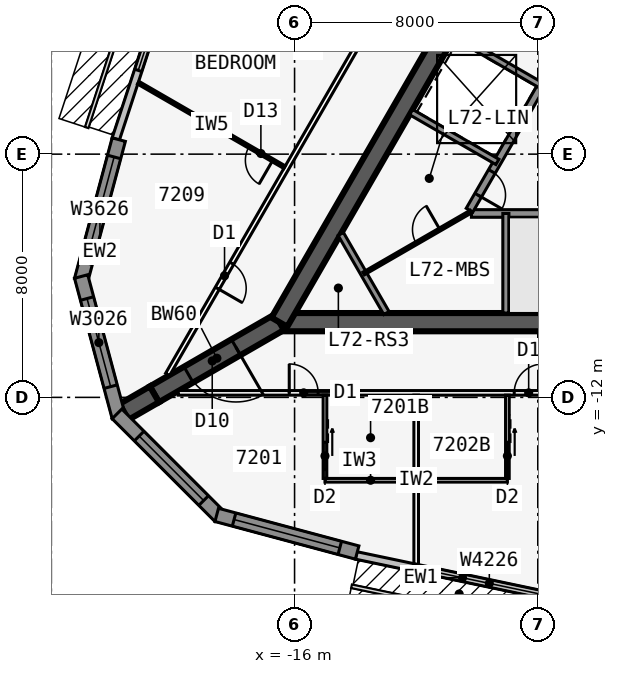
"""IFC4 building model, lengths in metres.
Left out: names, types, materials, properties, quantities, classifications, styles, units other than length and angle.
Written with IfcOpenShell. Run it as: python <this file> out.ifc"""

import sys

from ifc_helpers import new_model, si_unit, direction, frame, frame_2d, origin, place, context, subcontext, project, spatial, polyline, rectangle, outline, extrude, element, fill, save


model = new_model("IFC4")
c1 = context("Model", 3, precision=1e-05, world=origin(), true_north=direction((0.0, 1.0)))
c2 = subcontext(c1, "Body", "Model", "MODEL_VIEW")
j1 = project(units=[si_unit("LENGTHUNIT", "METRE"), si_unit("PLANEANGLEUNIT", "RADIAN")], contexts=[c1])
p1 = place(None, origin())
s1 = spatial("IfcSite", under=j1, at=p1, CompositionType="ELEMENT")
p2 = place(p1, origin())
s2 = spatial("IfcBuilding", under=s1, at=p2, CompositionType="ELEMENT")
p3 = place(p2, frame((0.0, 0.0, 271.7)))
s3 = spatial("IfcBuildingStorey", under=s2, at=p3, CompositionType="ELEMENT", Elevation=271.7)
p4 = place(p3, frame((-16.5, -9.526, 0.0), z_axis=(0.0, 0.0, 1.0), x_axis=(1.0, 0.0, 0.0)))
e1 = element("IfcWall", 1, at=p4, inside=s3, PredefinedType="SHEAR", context=c2, shape_type="SweptSolid", body=[
    extrude(rectangle(XDim=33.0, YDim=0.6, at=frame_2d((16.5, 0.0))), origin(), (0.0, 0.0, 1.0), 3.6),
])
p5 = place(p4, frame((14.05, 0.0, 0.0)))
e2 = element("IfcOpeningElement", 2, at=p5, cuts=e1, PredefinedType="OPENING", context=c2, shape_type="SweptSolid", body=[
    extrude(rectangle(XDim=1.8, YDim=2.13, at=frame_2d((0.9, 1.065))), frame((0.0, 0.31, 0.0), z_axis=(0.0, -1.0, 0.0), x_axis=(1.0, 0.0, 0.0)), (0.0, 0.0, 1.0), 0.62),
])
p6 = place(p3, frame((-10.183, -5.951, 0.0), z_axis=(0.0, 0.0, 1.0), x_axis=(1.0, 0.0, 0.0)))
e3 = element("IfcWall", 3, at=p6, inside=s3, PredefinedType="SOLIDWALL", context=c2, shape_type="SweptSolid", body=[
    extrude(rectangle(XDim=7.633, YDim=0.25, at=frame_2d((3.816, 0.0))), origin(), (0.0, 0.0, 1.0), 3.35),
])
p7 = place(p3, frame((-9.05, -5.951, 0.0), z_axis=(0.0, 0.0, 1.0), x_axis=(0.0, -1.0, 0.0)))
e4 = element("IfcWall", 4, at=p7, inside=s3, PredefinedType="SOLIDWALL", context=c2, shape_type="SweptSolid", body=[
    extrude(rectangle(XDim=3.275, YDim=0.2, at=frame_2d((1.637, 0.0))), origin(), (0.0, 0.0, 1.0), 3.35),
])
p8 = place(p3, frame((0.0, 19.052, 0.0), z_axis=(0.0, 0.0, 1.0), x_axis=(-0.499999749417, -0.866025548458, 0.0)))
e5 = element("IfcWall", 5, at=p8, inside=s3, PredefinedType="SHEAR", context=c2, shape_type="SweptSolid", body=[
    extrude(rectangle(XDim=33.0, YDim=0.6, at=frame_2d((16.5, 0.0))), origin(), (0.0, 0.0, 1.0), 3.6),
])
p9 = place(p8, frame((14.15, 0.0, 0.0)))
e6 = element("IfcOpeningElement", 6, at=p9, cuts=e5, PredefinedType="OPENING", context=c2, shape_type="SweptSolid", body=[
    extrude(rectangle(XDim=1.8, YDim=2.13, at=frame_2d((0.9, 1.065))), frame((0.0, 0.31, 0.0), z_axis=(0.0, -1.0, 0.0), x_axis=(1.0, 0.0, 0.0)), (0.0, 0.0, 1.0), 0.62),
])
p10 = place(p8, frame((12.6, 0.0, 0.0)))
e7 = element("IfcOpeningElement", 7, at=p10, cuts=e5, PredefinedType="OPENING", context=c2, shape_type="SweptSolid", body=[
    extrude(rectangle(XDim=1.0, YDim=2.13, at=frame_2d((0.5, 1.065))), frame((0.0, 0.31, 0.0), z_axis=(0.0, -1.0, 0.0), x_axis=(1.0, 0.0, 0.0)), (0.0, 0.0, 1.0), 0.62),
])
p11 = place(p3, frame((-4.929, 3.365, 0.0), z_axis=(0.0, 0.0, 1.0), x_axis=(-0.499991433582, -0.866030349552, 0.0)))
e8 = element("IfcWall", 8, at=p11, inside=s3, PredefinedType="SOLIDWALL", context=c2, shape_type="SweptSolid", body=[
    extrude(rectangle(XDim=10.633, YDim=0.25, at=frame_2d((5.316, 0.0))), origin(), (0.0, 0.0, 1.0), 3.35),
])
p12 = place(p11, frame((9.164, 0.0, 0.0)))
e9 = element("IfcOpeningElement", 9, at=p12, cuts=e8, PredefinedType="OPENING", context=c2, shape_type="SweptSolid", body=[
    extrude(rectangle(XDim=0.9, YDim=2.13, at=frame_2d((0.45, 1.065))), frame((0.0, 0.135, 0.0), z_axis=(0.0, -1.0, 0.0), x_axis=(1.0, 0.0, 0.0)), (0.0, 0.0, 1.0), 0.27),
])
p13 = place(p11, frame((1.1, 0.0, 0.0)))
e10 = element("IfcOpeningElement", 10, at=p13, cuts=e8, PredefinedType="OPENING", context=c2, shape_type="SweptSolid", body=[
    extrude(rectangle(XDim=0.9, YDim=2.13, at=frame_2d((0.45, 1.065))), frame((0.0, 0.135, 0.0), z_axis=(0.0, -1.0, 0.0), x_axis=(1.0, 0.0, 0.0)), (0.0, 0.0, 1.0), 0.27),
])
p14 = place(p11, frame((4.0, 0.0, 0.0)))
e11 = element("IfcOpeningElement", 11, at=p14, cuts=e8, PredefinedType="OPENING", context=c2, shape_type="SweptSolid", body=[
    extrude(rectangle(XDim=0.9, YDim=2.13, at=frame_2d((0.45, 1.065))), frame((0.0, 0.135, 0.0), z_axis=(0.0, -1.0, 0.0), x_axis=(1.0, 0.0, 0.0)), (0.0, 0.0, 1.0), 0.27),
])
for number, where, z_axis, x_axis in (
    (12, (-7.879, -1.744, 0.0), (0.0, 0.0, 1.0), (-0.866, 0.5, 0.0)),
    (13, (-9.329, -4.256, 0.0), (0.0, 0.0, 1.0), (-0.866, 0.5, 0.0)),
):
    element("IfcWall", number, at=place(p3, frame(where, z_axis=z_axis, x_axis=x_axis)), inside=s3, PredefinedType="SOLIDWALL", context=c2, shape_type="SweptSolid", body=[
        extrude(rectangle(XDim=3.275, YDim=0.2, at=frame_2d((1.637, 0.0))), origin(), (0.0, 0.0, 1.0), 3.35),
    ])
p15 = place(p3, frame((-16.5, -9.526, 0.0), z_axis=(0.0, 0.0, 1.0), x_axis=(-0.866031398331, -0.499989616998, 0.0)))
e14 = element("IfcWall", 14, at=p15, inside=s3, PredefinedType="SHEAR", context=c2, shape_type="SweptSolid", body=[
    extrude(rectangle(XDim=4.746, YDim=0.6, at=frame_2d((2.373, 0.0))), origin(), (0.0, 0.0, 1.0), 3.6),
])
p16 = place(p15, frame((1.65, 0.0, 0.0)))
e15 = element("IfcOpeningElement", 15, at=p16, cuts=e14, PredefinedType="OPENING", context=c2, shape_type="SweptSolid", body=[
    extrude(rectangle(XDim=1.8, YDim=2.13, at=frame_2d((0.9, 1.065))), frame((0.0, 0.31, 0.0), z_axis=(0.0, -1.0, 0.0), x_axis=(1.0, 0.0, 0.0)), (0.0, 0.0, 1.0), 0.62),
])
p17 = place(p3, frame((-20.61, -11.899, 0.0), z_axis=(0.0, 0.0, 1.0), x_axis=(-0.866009537788, -0.500027479704, 0.0)))
e16 = element("IfcWall", 16, at=p17, inside=s3, PredefinedType="SHEAR", context=c2, shape_type="SweptSolid", body=[
    extrude(rectangle(XDim=1.155, YDim=0.6, at=frame_2d((0.577, 0.0))), origin(), (0.0, 0.0, 1.0), 3.6),
])
p18 = place(p3, frame((-13.974, -17.198, 0.0), z_axis=(0.0, 0.0, 1.0), x_axis=(0.978654320409, -0.205513311355, 0.0)))
e17 = element("IfcWall", 17, at=p18, inside=s3, PredefinedType="STANDARD", context=c2, shape_type="SweptSolid", body=[
    extrude(rectangle(XDim=7.153, YDim=0.25, at=frame_2d((3.576, 0.0))), origin(), (0.0, 0.0, 1.0), 3.35),
])
p19 = place(p18, frame((2.376, 0.0, 0.45)))
e18 = element("IfcOpeningElement", 18, at=p19, cuts=e17, PredefinedType="OPENING", context=c2, shape_type="SweptSolid", body=[
    extrude(rectangle(XDim=4.2, YDim=2.6, at=frame_2d((2.1, 1.3))), frame((0.0, 0.135, 0.0), z_axis=(0.0, -1.0, 0.0), x_axis=(1.0, 0.0, 0.0)), (0.0, 0.0, 1.0), 0.27),
])
p20 = place(p3, frame((-19.654, 3.294, 0.0), z_axis=(0.0, 0.0, 1.0), x_axis=(-0.311328857048, -0.95030223759, 0.0)))
e19 = element("IfcWall", 19, at=p20, inside=s3, PredefinedType="STANDARD", context=c2, shape_type="SweptSolid", body=[
    extrude(rectangle(XDim=7.153, YDim=0.25, at=frame_2d((3.576, 0.0))), origin(), (0.0, 0.0, 1.0), 3.35),
])
p21 = place(p20, frame((0.577, 0.0, 0.45)))
e20 = element("IfcOpeningElement", 20, at=p21, cuts=e19, PredefinedType="OPENING", context=c2, shape_type="SweptSolid", body=[
    extrude(rectangle(XDim=4.2, YDim=2.6, at=frame_2d((2.1, 1.3))), frame((0.0, 0.135, 0.0), z_axis=(0.0, -1.0, 0.0), x_axis=(1.0, 0.0, 0.0)), (0.0, 0.0, 1.0), 0.27),
])
p22 = place(p3, frame((-21.783, -3.522, 0.0), z_axis=(0.0, 0.0, 1.0), x_axis=(-0.25880328844, -0.965930048136, 0.0)))
e21 = element("IfcWall", 21, at=p22, inside=s3, PredefinedType="SOLIDWALL", context=c2, shape_type="SweptSolid", body=[
    extrude(rectangle(XDim=4.782, YDim=0.45, at=frame_2d((2.391, 0.0))), origin(), (0.0, 0.0, 1.0), 3.35),
])
p23 = place(p22, frame((0.591, 0.0, 0.45)))
e22 = element("IfcOpeningElement", 22, at=p23, cuts=e21, PredefinedType="OPENING", context=c2, shape_type="SweptSolid", body=[
    extrude(rectangle(XDim=3.6, YDim=2.6, at=frame_2d((1.8, 1.3))), frame((0.0, 0.235, 0.0), z_axis=(0.0, -1.0, 0.0), x_axis=(1.0, 0.0, 0.0)), (0.0, 0.0, 1.0), 0.47),
])
p24 = place(p3, frame((-23.02, -8.025, 0.0), z_axis=(0.0, 0.0, 1.0), x_axis=(0.25880328844, -0.965930048136, 0.0)))
e23 = element("IfcWall", 23, at=p24, inside=s3, PredefinedType="SOLIDWALL", context=c2, shape_type="SweptSolid", body=[
    extrude(outline(polyline([(4.782, 0.225), (4.722, 0.225), (4.375, 0.132), (4.351, 0.225), (0.0, 0.225), (0.0, -0.225), (4.782, -0.225), (4.782, 0.225)])), origin(), (0.0, 0.0, 1.0), 3.35),
])
p25 = place(p24, frame((0.75, 0.0, 0.45)))
e24 = element("IfcOpeningElement", 24, at=p25, cuts=e23, PredefinedType="OPENING", context=c2, shape_type="SweptSolid", body=[
    extrude(rectangle(XDim=3.0, YDim=2.6, at=frame_2d((1.5, 1.3))), frame((0.0, 0.235, 0.0), z_axis=(0.0, -1.0, 0.0), x_axis=(1.0, 0.0, 0.0)), (0.0, 0.0, 1.0), 0.47),
])
p26 = place(p3, frame((-21.841, -12.542, 0.0), z_axis=(0.0, 0.0, 1.0), x_axis=(0.707081252484, -0.707132308968, 0.0)))
e25 = element("IfcWall", 25, at=p26, inside=s3, PredefinedType="SOLIDWALL", context=c2, shape_type="SweptSolid", body=[
    extrude(outline(polyline([(4.782, 0.225), (0.431, 0.225), (0.406, 0.132), (0.059, 0.225), (0.0, 0.225), (0.0, -0.225), (4.782, -0.225), (4.782, 0.225)])), origin(), (0.0, 0.0, 1.0), 3.35),
])
p27 = place(p26, frame((1.031, 0.0, 0.45)))
e26 = element("IfcOpeningElement", 26, at=p27, cuts=e25, PredefinedType="OPENING", context=c2, shape_type="SweptSolid", body=[
    extrude(rectangle(XDim=3.0, YDim=2.6, at=frame_2d((1.5, 1.3))), frame((0.0, 0.235, 0.0), z_axis=(0.0, -1.0, 0.0), x_axis=(1.0, 0.0, 0.0)), (0.0, 0.0, 1.0), 0.47),
])
p28 = place(p3, frame((-18.561, -15.865, 0.0), z_axis=(0.0, 0.0, 1.0), x_axis=(0.965913862671, -0.258863689806, 0.0)))
e27 = element("IfcWall", 27, at=p28, inside=s3, PredefinedType="SOLIDWALL", context=c2, shape_type="SweptSolid", body=[
    extrude(rectangle(XDim=4.782, YDim=0.45, at=frame_2d((2.391, 0.0))), origin(), (0.0, 0.0, 1.0), 3.35),
])
p29 = place(p28, frame((0.591, 0.0, 0.45)))
e28 = element("IfcOpeningElement", 28, at=p29, cuts=e27, PredefinedType="OPENING", context=c2, shape_type="SweptSolid", body=[
    extrude(rectangle(XDim=3.6, YDim=2.6, at=frame_2d((1.8, 1.3))), frame((0.0, 0.235, 0.0), z_axis=(0.0, -1.0, 0.0), x_axis=(1.0, 0.0, 0.0)), (0.0, 0.0, 1.0), 0.47),
])
p30 = place(p3, frame((-19.827, -11.851, 0.0), z_axis=(0.0, 0.0, 1.0), x_axis=(1.0, 0.0, 0.0)))
e29 = element("IfcWall", 29, at=p30, inside=s3, PredefinedType="PARTITIONING", context=c2, shape_type="SweptSolid", body=[
    extrude(rectangle(XDim=39.654, YDim=0.15, at=frame_2d((19.827, 0.0))), origin(), (0.0, 0.0, 1.0), 3.35),
])
p31 = place(p30, frame((3.652, 0.0, 0.0)))
e30 = element("IfcOpeningElement", 30, at=p31, cuts=e29, PredefinedType="OPENING", context=c2, shape_type="SweptSolid", body=[
    extrude(rectangle(XDim=0.95, YDim=2.13, at=frame_2d((0.475, 1.065))), frame((0.0, 0.085, 0.0), z_axis=(0.0, -1.0, 0.0), x_axis=(1.0, 0.0, 0.0)), (0.0, 0.0, 1.0), 0.17),
])
p32 = place(p30, frame((11.052, 0.0, 0.0)))
e31 = element("IfcOpeningElement", 31, at=p32, cuts=e29, PredefinedType="OPENING", context=c2, shape_type="SweptSolid", body=[
    extrude(rectangle(XDim=0.95, YDim=2.13, at=frame_2d((0.475, 1.065))), frame((0.0, 0.085, 0.0), z_axis=(0.0, -1.0, 0.0), x_axis=(1.0, 0.0, 0.0)), (0.0, 0.0, 1.0), 0.17),
])
p33 = place(p30, frame((19.052, 0.0, 0.0)))
e32 = element("IfcOpeningElement", 32, at=p33, cuts=e29, PredefinedType="OPENING", context=c2, shape_type="SweptSolid", body=[
    extrude(rectangle(XDim=0.95, YDim=2.13, at=frame_2d((0.475, 1.065))), frame((0.0, 0.085, 0.0), z_axis=(0.0, -1.0, 0.0), x_axis=(1.0, 0.0, 0.0)), (0.0, 0.0, 1.0), 0.17),
])
p34 = place(p30, frame((27.052, 0.0, 0.0)))
e33 = element("IfcOpeningElement", 33, at=p34, cuts=e29, PredefinedType="OPENING", context=c2, shape_type="SweptSolid", body=[
    extrude(rectangle(XDim=0.95, YDim=2.13, at=frame_2d((0.475, 1.065))), frame((0.0, 0.085, 0.0), z_axis=(0.0, -1.0, 0.0), x_axis=(1.0, 0.0, 0.0)), (0.0, 0.0, 1.0), 0.17),
])
p35 = place(p30, frame((35.052, 0.0, 0.0)))
e34 = element("IfcOpeningElement", 34, at=p35, cuts=e29, PredefinedType="OPENING", context=c2, shape_type="SweptSolid", body=[
    extrude(rectangle(XDim=0.95, YDim=2.13, at=frame_2d((0.475, 1.065))), frame((0.0, 0.085, 0.0), z_axis=(0.0, -1.0, 0.0), x_axis=(1.0, 0.0, 0.0)), (0.0, 0.0, 1.0), 0.17),
])
p36 = place(p3, frame((-12.0, -11.926, 0.0), z_axis=(0.0, 0.0, 1.0), x_axis=(0.0, -1.0, 0.0)))
e35 = element("IfcWall", 35, at=p36, inside=s3, PredefinedType="PARTITIONING", context=c2, shape_type="SweptSolid", body=[
    extrude(rectangle(XDim=5.559, YDim=0.15, at=frame_2d((2.779, 0.0))), origin(), (0.0, 0.0, 1.0), 2.301),
])
p37 = place(p3, frame((-15.0, -14.726, 0.0), z_axis=(0.0, 0.0, 1.0), x_axis=(1.0, 0.0, 0.0)))
e36 = element("IfcWall", 36, at=p37, inside=s3, PredefinedType="PLUMBINGWALL", context=c2, shape_type="SweptSolid", body=[
    extrude(rectangle(XDim=3.0, YDim=0.12, at=frame_2d((1.5, 0.0))), origin(), (0.0, 0.0, 1.0), 3.35),
])
p38 = place(p3, frame((-15.0, -11.926, 0.0), z_axis=(0.0, 0.0, 1.0), x_axis=(0.0, -1.0, 0.0)))
e37 = element("IfcWall", 37, at=p38, inside=s3, PredefinedType="PLUMBINGWALL", context=c2, shape_type="SweptSolid", body=[
    extrude(rectangle(XDim=2.74, YDim=0.12, at=frame_2d((1.37, 0.0))), origin(), (0.0, 0.0, 1.0), 3.35),
])
p39 = place(p38, frame((1.55, 0.0, 0.0)))
e38 = element("IfcOpeningElement", 38, at=p39, cuts=e37, PredefinedType="OPENING", context=c2, shape_type="SweptSolid", body=[
    extrude(rectangle(XDim=0.9, YDim=2.13, at=frame_2d((0.45, 1.065))), frame((0.0, 0.07, 0.0), z_axis=(0.0, -1.0, 0.0), x_axis=(1.0, 0.0, 0.0)), (0.0, 0.0, 1.0), 0.14),
])
p40 = place(p3, frame((-12.0, -14.726, 0.0), z_axis=(0.0, 0.0, 1.0), x_axis=(1.0, 0.0, 0.0)))
e39 = element("IfcWall", 39, at=p40, inside=s3, PredefinedType="PLUMBINGWALL", context=c2, shape_type="SweptSolid", body=[
    extrude(rectangle(XDim=3.0, YDim=0.12, at=frame_2d((1.5, 0.0))), origin(), (0.0, 0.0, 1.0), 3.35),
])
p41 = place(p3, frame((-9.0, -11.926, 0.0), z_axis=(0.0, 0.0, 1.0), x_axis=(0.0, -1.0, 0.0)))
e40 = element("IfcWall", 40, at=p41, inside=s3, PredefinedType="PLUMBINGWALL", context=c2, shape_type="SweptSolid", body=[
    extrude(rectangle(XDim=2.74, YDim=0.12, at=frame_2d((1.37, 0.0))), origin(), (0.0, 0.0, 1.0), 3.35),
])
p42 = place(p41, frame((1.55, 0.0, 0.0)))
e41 = element("IfcOpeningElement", 41, at=p42, cuts=e40, PredefinedType="OPENING", context=c2, shape_type="SweptSolid", body=[
    extrude(rectangle(XDim=0.9, YDim=2.13, at=frame_2d((0.45, 1.065))), frame((0.0, 0.07, 0.0), z_axis=(0.0, -1.0, 0.0), x_axis=(1.0, 0.0, 0.0)), (0.0, 0.0, 1.0), 0.14),
])
p43 = place(p3, frame((-0.35, 23.096, 0.0), z_axis=(0.0, 0.0, 1.0), x_axis=(-0.499998875317, -0.866026053119, 0.0)))
e42 = element("IfcWall", 42, at=p43, inside=s3, PredefinedType="PARTITIONING", context=c2, shape_type="SweptSolid", body=[
    extrude(rectangle(XDim=39.654, YDim=0.15, at=frame_2d((19.827, 0.0))), origin(), (0.0, 0.0, 1.0), 3.35),
])
p44 = place(p43, frame((3.272, 0.0, 0.0)))
e43 = element("IfcOpeningElement", 43, at=p44, cuts=e42, PredefinedType="OPENING", context=c2, shape_type="SweptSolid", body=[
    extrude(rectangle(XDim=0.95, YDim=2.13, at=frame_2d((0.475, 1.065))), frame((0.0, 0.085, 0.0), z_axis=(0.0, -1.0, 0.0), x_axis=(1.0, 0.0, 0.0)), (0.0, 0.0, 1.0), 0.17),
])
p45 = place(p43, frame((19.052, 0.0, 0.0)))
e44 = element("IfcOpeningElement", 44, at=p45, cuts=e42, PredefinedType="OPENING", context=c2, shape_type="SweptSolid", body=[
    extrude(rectangle(XDim=0.95, YDim=2.13, at=frame_2d((0.475, 1.065))), frame((0.0, 0.085, 0.0), z_axis=(0.0, -1.0, 0.0), x_axis=(1.0, 0.0, 0.0)), (0.0, 0.0, 1.0), 0.17),
])
p46 = place(p43, frame((35.432, 0.0, 0.0)))
e45 = element("IfcOpeningElement", 45, at=p46, cuts=e42, PredefinedType="OPENING", context=c2, shape_type="SweptSolid", body=[
    extrude(rectangle(XDim=0.95, YDim=2.13, at=frame_2d((0.475, 1.065))), frame((0.0, 0.085, 0.0), z_axis=(0.0, -1.0, 0.0), x_axis=(1.0, 0.0, 0.0)), (0.0, 0.0, 1.0), 0.17),
])
p47 = place(p3, frame((-16.329, -4.429, 0.0), z_axis=(0.0, 0.0, 1.0), x_axis=(-0.866029066823, 0.499993655377, 0.0)))
e46 = element("IfcWall", 46, at=p47, inside=s3, PredefinedType="PARTITIONING", context=c2, shape_type="SweptSolid", body=[
    extrude(rectangle(XDim=5.559, YDim=0.1, at=frame_2d((2.779, 0.0))), origin(), (0.0, 0.0, 1.0), 2.301),
])
p48 = place(p47, frame((0.45, 0.0, 0.0)))
e47 = element("IfcOpeningElement", 47, at=p48, cuts=e46, PredefinedType="OPENING", context=c2, shape_type="SweptSolid", body=[
    extrude(rectangle(XDim=0.9, YDim=2.13, at=frame_2d((0.45, 1.065))), frame((0.0, 0.06, 0.0), z_axis=(0.0, -1.0, 0.0), x_axis=(1.0, 0.0, 0.0)), (0.0, 0.0, 1.0), 0.12),
])
p49 = place(p3, frame((-12.978, -9.226, 0.0), z_axis=(0.0, 0.0, 1.0), x_axis=(-0.499952404951, 0.866052881055, 0.0)))
e48 = element("IfcWall", 48, at=p49, inside=s3, PredefinedType="SOLIDWALL", context=c2, shape_type="SweptSolid", body=[
    extrude(rectangle(XDim=3.002, YDim=0.2, at=frame_2d((1.501, 0.0))), origin(), (0.0, 0.0, 1.0), 3.35),
])
p50 = place(p3, frame((-13.729, -7.926, 0.0), z_axis=(0.0, 0.0, 1.0), x_axis=(0.866029956157, 0.499992114976, 0.0)))
e49 = element("IfcWall", 49, at=p50, inside=s3, PredefinedType="PARTITIONING", context=c2, shape_type="SweptSolid", body=[
    extrude(rectangle(XDim=4.075, YDim=0.1, at=frame_2d((2.038, 0.0))), origin(), (0.0, 0.0, 1.0), 3.35),
])
p51 = place(p50, frame((1.995, 0.0, 0.0)))
e50 = element("IfcOpeningElement", 50, at=p51, cuts=e49, PredefinedType="OPENING", context=c2, shape_type="SweptSolid", body=[
    extrude(rectangle(XDim=0.9, YDim=2.13, at=frame_2d((0.45, 1.065))), frame((0.0, 0.06, 0.0), z_axis=(0.0, -1.0, 0.0), x_axis=(1.0, 0.0, 0.0)), (0.0, 0.0, 1.0), 0.12),
])
p52 = place(p19, origin())
e51 = element("IfcWindow", 51, at=p52, inside=s3, PartitioningType="SINGLE_PANEL", PredefinedType="WINDOW", context=c2, shape_type="SweptSolid", body=[
    extrude(rectangle(XDim=4.2, YDim=2.6, at=frame_2d((2.1, 1.3))), frame((0.0, 0.03, 0.0), z_axis=(0.0, -1.0, 0.0), x_axis=(1.0, 0.0, 0.0)), (0.0, 0.0, 1.0), 0.06),
])
fill(e18, e51)
p53 = place(p21, origin())
e52 = element("IfcWindow", 52, at=p53, inside=s3, PartitioningType="SINGLE_PANEL", PredefinedType="WINDOW", context=c2, shape_type="SweptSolid", body=[
    extrude(rectangle(XDim=4.2, YDim=2.6, at=frame_2d((2.1, 1.3))), frame((0.0, 0.03, 0.0), z_axis=(0.0, -1.0, 0.0), x_axis=(1.0, 0.0, 0.0)), (0.0, 0.0, 1.0), 0.06),
])
fill(e20, e52)
p54 = place(p23, origin())
e53 = element("IfcWindow", 53, at=p54, inside=s3, PartitioningType="SINGLE_PANEL", PredefinedType="WINDOW", context=c2, shape_type="SweptSolid", body=[
    extrude(rectangle(XDim=3.6, YDim=2.6, at=frame_2d((1.8, 1.3))), frame((0.0, 0.03, 0.0), z_axis=(0.0, -1.0, 0.0), x_axis=(1.0, 0.0, 0.0)), (0.0, 0.0, 1.0), 0.06),
])
fill(e22, e53)
p55 = place(p25, origin())
e54 = element("IfcWindow", 54, at=p55, inside=s3, PartitioningType="SINGLE_PANEL", PredefinedType="WINDOW", context=c2, shape_type="SweptSolid", body=[
    extrude(rectangle(XDim=3.0, YDim=2.6, at=frame_2d((1.5, 1.3))), frame((0.0, 0.03, 0.0), z_axis=(0.0, -1.0, 0.0), x_axis=(1.0, 0.0, 0.0)), (0.0, 0.0, 1.0), 0.06),
])
fill(e24, e54)
p56 = place(p27, origin())
e55 = element("IfcWindow", 55, at=p56, inside=s3, PartitioningType="SINGLE_PANEL", PredefinedType="WINDOW", context=c2, shape_type="SweptSolid", body=[
    extrude(rectangle(XDim=3.0, YDim=2.6, at=frame_2d((1.5, 1.3))), frame((0.0, 0.03, 0.0), z_axis=(0.0, -1.0, 0.0), x_axis=(1.0, 0.0, 0.0)), (0.0, 0.0, 1.0), 0.06),
])
fill(e26, e55)
p57 = place(p29, origin())
e56 = element("IfcWindow", 56, at=p57, inside=s3, PartitioningType="SINGLE_PANEL", PredefinedType="WINDOW", context=c2, shape_type="SweptSolid", body=[
    extrude(rectangle(XDim=3.6, YDim=2.6, at=frame_2d((1.8, 1.3))), frame((0.0, 0.03, 0.0), z_axis=(0.0, -1.0, 0.0), x_axis=(1.0, 0.0, 0.0)), (0.0, 0.0, 1.0), 0.06),
])
fill(e28, e56)
p58 = place(p39, origin())
e57 = element("IfcDoor", 57, at=p58, inside=s3, OperationType="SLIDING_TO_LEFT", PredefinedType="DOOR", context=c2, shape_type="SweptSolid", body=[
    extrude(rectangle(XDim=0.9, YDim=2.13, at=frame_2d((0.45, 1.065))), frame((0.0, 0.025, 0.0), z_axis=(0.0, -1.0, 0.0), x_axis=(1.0, 0.0, 0.0)), (0.0, 0.0, 1.0), 0.05),
])
fill(e38, e57)
p59 = place(p31, origin())
e58 = element("IfcDoor", 58, at=p59, inside=s3, OperationType="SINGLE_SWING_LEFT", PredefinedType="DOOR", context=c2, shape_type="SweptSolid", body=[
    extrude(rectangle(XDim=0.95, YDim=2.13, at=frame_2d((0.475, 1.065))), frame((0.0, 0.025, 0.0), z_axis=(0.0, -1.0, 0.0), x_axis=(1.0, 0.0, 0.0)), (0.0, 0.0, 1.0), 0.05),
])
fill(e30, e58)
p60 = place(p42, origin())
e59 = element("IfcDoor", 59, at=p60, inside=s3, OperationType="SLIDING_TO_LEFT", PredefinedType="DOOR", context=c2, shape_type="SweptSolid", body=[
    extrude(rectangle(XDim=0.9, YDim=2.13, at=frame_2d((0.45, 1.065))), frame((0.0, 0.025, 0.0), z_axis=(0.0, -1.0, 0.0), x_axis=(1.0, 0.0, 0.0)), (0.0, 0.0, 1.0), 0.05),
])
fill(e41, e59)
p61 = place(p32, origin())
e60 = element("IfcDoor", 60, at=p61, inside=s3, OperationType="SINGLE_SWING_RIGHT", PredefinedType="DOOR", context=c2, shape_type="SweptSolid", body=[
    extrude(rectangle(XDim=0.95, YDim=2.13, at=frame_2d((0.475, 1.065))), frame((0.0, 0.025, 0.0), z_axis=(0.0, -1.0, 0.0), x_axis=(1.0, 0.0, 0.0)), (0.0, 0.0, 1.0), 0.05),
])
fill(e31, e60)
p62 = place(p48, origin())
e61 = element("IfcDoor", 61, at=p62, inside=s3, OperationType="SINGLE_SWING_LEFT", PredefinedType="DOOR", context=c2, shape_type="SweptSolid", body=[
    extrude(rectangle(XDim=0.9, YDim=2.13, at=frame_2d((0.45, 1.065))), frame((0.0, 0.025, 0.0), z_axis=(0.0, -1.0, 0.0), x_axis=(1.0, 0.0, 0.0)), (0.0, 0.0, 1.0), 0.05),
])
fill(e47, e61)
p63 = place(p46, origin())
e62 = element("IfcDoor", 62, at=p63, inside=s3, OperationType="SINGLE_SWING_RIGHT", PredefinedType="DOOR", context=c2, shape_type="SweptSolid", body=[
    extrude(rectangle(XDim=0.95, YDim=2.13, at=frame_2d((0.475, 1.065))), frame((0.0, 0.025, 0.0), z_axis=(0.0, -1.0, 0.0), x_axis=(1.0, 0.0, 0.0)), (0.0, 0.0, 1.0), 0.05),
])
fill(e45, e62)
p64 = place(p16, origin())
e63 = element("IfcDoor", 63, at=p64, inside=s3, OperationType="DOUBLE_DOOR_DOUBLE_SWING", PredefinedType="DOOR", context=c2, shape_type="SweptSolid", body=[
    extrude(rectangle(XDim=1.8, YDim=2.13, at=frame_2d((0.9, 1.065))), frame((0.0, 0.025, 0.0), z_axis=(0.0, -1.0, 0.0), x_axis=(1.0, 0.0, 0.0)), (0.0, 0.0, 1.0), 0.05),
])
fill(e15, e63)
p65 = place(p12, origin())
e64 = element("IfcDoor", 64, at=p65, inside=s3, OperationType="SINGLE_SWING_RIGHT", PredefinedType="DOOR", context=c2, shape_type="SweptSolid", body=[
    extrude(rectangle(XDim=0.9, YDim=2.13, at=frame_2d((0.45, 1.065))), frame((0.0, 0.025, 0.0), z_axis=(0.0, -1.0, 0.0), x_axis=(1.0, 0.0, 0.0)), (0.0, 0.0, 1.0), 0.05),
])
fill(e9, e64)
p66 = place(p51, origin())
e65 = element("IfcDoor", 65, at=p66, inside=s3, OperationType="SINGLE_SWING_RIGHT", PredefinedType="DOOR", context=c2, shape_type="SweptSolid", body=[
    extrude(rectangle(XDim=0.9, YDim=2.13, at=frame_2d((0.45, 1.065))), frame((0.0, 0.025, 0.0), z_axis=(0.0, -1.0, 0.0), x_axis=(1.0, 0.0, 0.0)), (0.0, 0.0, 1.0), 0.05),
])
fill(e50, e65)
save(model, sys.argv[1])
